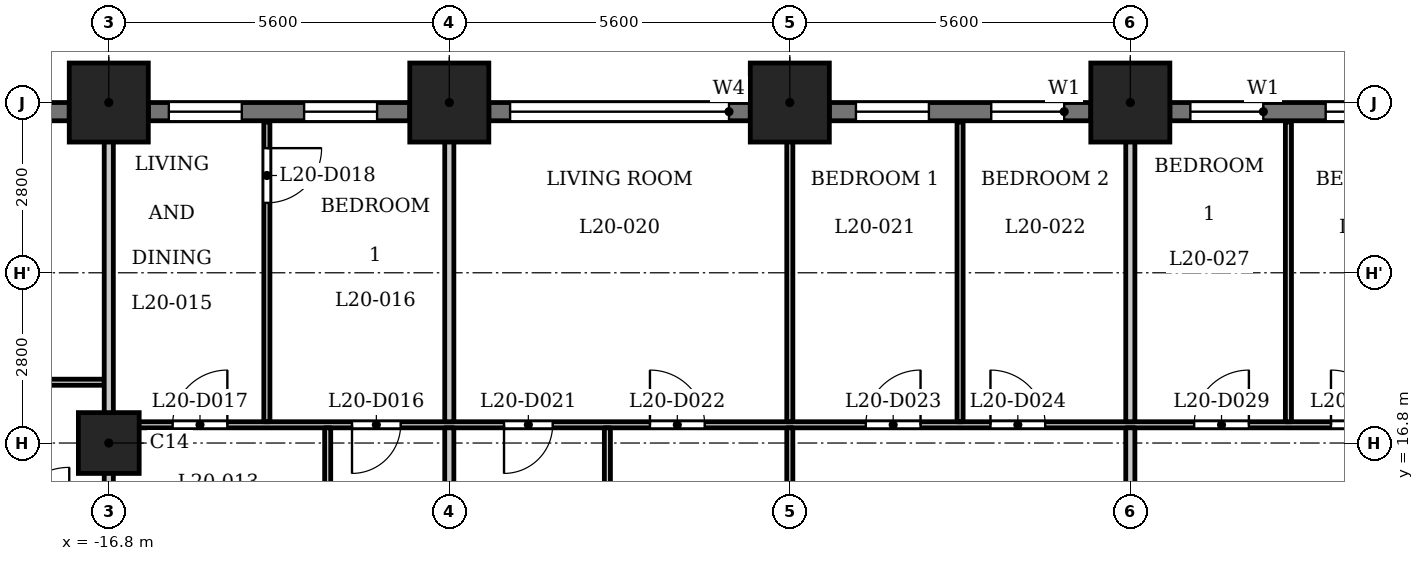
"""IFC4 building model, lengths in metres.
Left out: names, types, materials, properties, quantities, classifications, styles, units other than length and angle.
Written with IfcOpenShell. Run it as: python <this file> out.ifc"""

import sys

from ifc_helpers import new_model, si_unit, direction, frame, frame_2d, origin, origin_2d, place, context, subcontext, project, spatial, rectangle, extrude, element, fill, save


model = new_model("IFC4")
c1 = context("Model", 3, precision=1e-05, world=origin(), true_north=direction((0.0, 1.0)))
c2 = subcontext(c1, "Body", "Model", "MODEL_VIEW")
j1 = project(units=[si_unit("LENGTHUNIT", "METRE"), si_unit("PLANEANGLEUNIT", "RADIAN")], contexts=[c1])
p1 = place(None, origin())
s1 = spatial("IfcSite", under=j1, at=p1, CompositionType="ELEMENT")
p2 = place(p1, origin())
s2 = spatial("IfcBuilding", under=s1, at=p2, CompositionType="ELEMENT")
p3 = place(p2, frame((0.0, 0.0, 83.3)))
s3 = spatial("IfcBuildingStorey", under=s2, at=p3, CompositionType="ELEMENT", Elevation=83.3)
for number, where, z_axis, x_axis in (
    (1, (0.0, 22.4, 0.0), (0.0, 0.0, 1.0), (1.0, 0.0, 0.0)),
    (2, (-5.6, 22.4, 0.0), (0.0, 0.0, 1.0), (1.0, 0.0, 0.0)),
    (3, (-11.2, 22.4, 0.0), (0.0, 0.0, 1.0), (1.0, 0.0, 0.0)),
    (4, (-16.8, 22.4, 0.0), (0.0, 0.0, 1.0), (1.0, 0.0, 0.0)),
):
    element("IfcColumn", number, at=place(p3, frame(where, z_axis=z_axis, x_axis=x_axis)), inside=s3, PredefinedType="COLUMN", context=c2, shape_type="SweptSolid", body=[
        extrude(rectangle(XDim=1.3, YDim=1.3, at=origin_2d()), origin(), (0.0, 0.0, 1.0), 3.5),
    ])
p4 = place(p3, frame((-16.8, 16.8, 0.0), z_axis=(0.0, 0.0, 1.0), x_axis=(1.0, 0.0, 0.0)))
e5 = element("IfcColumn", 5, at=p4, inside=s3, PredefinedType="COLUMN", context=c2, shape_type="SweptSolid", body=[
    extrude(rectangle(XDim=1.0, YDim=1.0, at=origin_2d()), origin(), (0.0, 0.0, 1.0), 3.5),
])
p5 = place(p3, frame((4.95, 22.25, 0.0), z_axis=(0.0, 0.0, 1.0), x_axis=(-1.0, 0.0, 0.0)))
e6 = element("IfcWall", 6, at=p5, inside=s3, PredefinedType="SOLIDWALL", context=c2, shape_type="SweptSolid", body=[
    extrude(rectangle(XDim=4.3, YDim=0.3, at=frame_2d((2.15, 0.0))), origin(), (0.0, 0.0, 1.0), 2.4),
])
p6 = place(p5, frame((0.538, 0.0, 0.6)))
e7 = element("IfcOpeningElement", 7, at=p6, cuts=e6, PredefinedType="OPENING", context=c2, shape_type="SweptSolid", body=[
    extrude(rectangle(XDim=1.2, YDim=1.55, at=frame_2d((0.6, 0.775))), frame((0.0, 0.16, 0.0), z_axis=(0.0, -1.0, 0.0), x_axis=(1.0, 0.0, 0.0)), (0.0, 0.0, 1.0), 0.32),
])
p7 = place(p5, frame((2.762, 0.0, 0.6)))
e8 = element("IfcOpeningElement", 8, at=p7, cuts=e6, PredefinedType="OPENING", context=c2, shape_type="SweptSolid", body=[
    extrude(rectangle(XDim=1.2, YDim=1.55, at=frame_2d((0.6, 0.775))), frame((0.0, 0.16, 0.0), z_axis=(0.0, -1.0, 0.0), x_axis=(1.0, 0.0, 0.0)), (0.0, 0.0, 1.0), 0.32),
])
p8 = place(p3, frame((-0.65, 22.25, 0.0), z_axis=(0.0, 0.0, 1.0), x_axis=(-1.0, 0.0, 0.0)))
e9 = element("IfcWall", 9, at=p8, inside=s3, PredefinedType="SOLIDWALL", context=c2, shape_type="SweptSolid", body=[
    extrude(rectangle(XDim=4.3, YDim=0.3, at=frame_2d((2.15, 0.0))), origin(), (0.0, 0.0, 1.0), 2.4),
])
p9 = place(p8, frame((0.438, 0.0, 0.6)))
e10 = element("IfcOpeningElement", 10, at=p9, cuts=e9, PredefinedType="OPENING", context=c2, shape_type="SweptSolid", body=[
    extrude(rectangle(XDim=1.2, YDim=1.55, at=frame_2d((0.6, 0.775))), frame((0.0, 0.16, 0.0), z_axis=(0.0, -1.0, 0.0), x_axis=(1.0, 0.0, 0.0)), (0.0, 0.0, 1.0), 0.32),
])
p10 = place(p8, frame((2.663, 0.0, 0.6)))
e11 = element("IfcOpeningElement", 11, at=p10, cuts=e9, PredefinedType="OPENING", context=c2, shape_type="SweptSolid", body=[
    extrude(rectangle(XDim=1.2, YDim=1.55, at=frame_2d((0.6, 0.775))), frame((0.0, 0.16, 0.0), z_axis=(0.0, -1.0, 0.0), x_axis=(1.0, 0.0, 0.0)), (0.0, 0.0, 1.0), 0.32),
])
p11 = place(p3, frame((-6.25, 22.25, 0.0), z_axis=(0.0, 0.0, 1.0), x_axis=(-1.0, 0.0, 0.0)))
e12 = element("IfcWall", 12, at=p11, inside=s3, PredefinedType="SOLIDWALL", context=c2, shape_type="SweptSolid", body=[
    extrude(rectangle(XDim=4.3, YDim=0.3, at=frame_2d((2.15, 0.0))), origin(), (0.0, 0.0, 1.0), 2.4),
])
p12 = place(p11, frame((0.35, 0.0, 1.2)))
e13 = element("IfcOpeningElement", 13, at=p12, cuts=e12, PredefinedType="OPENING", context=c2, shape_type="SweptSolid", body=[
    extrude(rectangle(XDim=3.6, YDim=0.95, at=frame_2d((1.8, 0.475))), frame((0.0, 0.16, 0.0), z_axis=(0.0, -1.0, 0.0), x_axis=(1.0, 0.0, 0.0)), (0.0, 0.0, 1.0), 0.32),
])
p13 = place(p3, frame((-11.85, 22.25, 0.0), z_axis=(0.0, 0.0, 1.0), x_axis=(-1.0, 0.0, 0.0)))
e14 = element("IfcWall", 14, at=p13, inside=s3, PredefinedType="SOLIDWALL", context=c2, shape_type="SweptSolid", body=[
    extrude(rectangle(XDim=4.3, YDim=0.3, at=frame_2d((2.15, 0.0))), origin(), (0.0, 0.0, 1.0), 2.4),
])
p14 = place(p13, frame((0.538, 0.0, 0.6)))
e15 = element("IfcOpeningElement", 15, at=p14, cuts=e14, PredefinedType="OPENING", context=c2, shape_type="SweptSolid", body=[
    extrude(rectangle(XDim=1.2, YDim=1.55, at=frame_2d((0.6, 0.775))), frame((0.0, 0.16, 0.0), z_axis=(0.0, -1.0, 0.0), x_axis=(1.0, 0.0, 0.0)), (0.0, 0.0, 1.0), 0.32),
])
p15 = place(p13, frame((2.762, 0.0, 0.6)))
e16 = element("IfcOpeningElement", 16, at=p15, cuts=e14, PredefinedType="OPENING", context=c2, shape_type="SweptSolid", body=[
    extrude(rectangle(XDim=1.2, YDim=1.55, at=frame_2d((0.6, 0.775))), frame((0.0, 0.16, 0.0), z_axis=(0.0, -1.0, 0.0), x_axis=(1.0, 0.0, 0.0)), (0.0, 0.0, 1.0), 0.32),
])
p16 = place(p3, frame((-17.45, 22.25, 0.0), z_axis=(0.0, 0.0, 1.0), x_axis=(-1.0, 0.0, 0.0)))
e17 = element("IfcWall", 17, at=p16, inside=s3, PredefinedType="SOLIDWALL", context=c2, shape_type="SweptSolid", body=[
    extrude(rectangle(XDim=2.55, YDim=0.3, at=frame_2d((1.275, 0.0))), origin(), (0.0, 0.0, 1.0), 2.4),
])
p17 = place(p16, frame((0.675, 0.0, 0.6)))
e18 = element("IfcOpeningElement", 18, at=p17, cuts=e17, PredefinedType="OPENING", context=c2, shape_type="SweptSolid", body=[
    extrude(rectangle(XDim=1.2, YDim=1.55, at=frame_2d((0.6, 0.775))), frame((0.0, 0.16, 0.0), z_axis=(0.0, -1.0, 0.0), x_axis=(1.0, 0.0, 0.0)), (0.0, 0.0, 1.0), 0.32),
])
p18 = place(p3, frame((-16.725, 17.1, 0.0), z_axis=(0.0, 0.0, 1.0), x_axis=(1.0, 0.0, 0.0)))
e19 = element("IfcWall", 19, at=p18, inside=s3, PredefinedType="PARTITIONING", context=c2, shape_type="SweptSolid", body=[
    extrude(rectangle(XDim=33.45, YDim=0.1, at=frame_2d((16.725, 0.0))), origin(), (0.0, 0.0, 1.0), 3.2),
])
p19 = place(p18, frame((3.925, 0.0, 0.0)))
e20 = element("IfcOpeningElement", 20, at=p19, cuts=e19, PredefinedType="OPENING", context=c2, shape_type="SweptSolid", body=[
    extrude(rectangle(XDim=0.8, YDim=2.1, at=frame_2d((0.4, 1.05))), frame((0.0, 0.06, 0.0), z_axis=(0.0, -1.0, 0.0), x_axis=(1.0, 0.0, 0.0)), (0.0, 0.0, 1.0), 0.12),
])
p20 = place(p18, frame((0.975, 0.0, 0.0)))
e21 = element("IfcOpeningElement", 21, at=p20, cuts=e19, PredefinedType="OPENING", context=c2, shape_type="SweptSolid", body=[
    extrude(rectangle(XDim=0.9, YDim=2.1, at=frame_2d((0.45, 1.05))), frame((0.0, 0.06, 0.0), z_axis=(0.0, -1.0, 0.0), x_axis=(1.0, 0.0, 0.0)), (0.0, 0.0, 1.0), 0.12),
])
p21 = place(p18, frame((6.425, 0.0, 0.0)))
e22 = element("IfcOpeningElement", 22, at=p21, cuts=e19, PredefinedType="OPENING", context=c2, shape_type="SweptSolid", body=[
    extrude(rectangle(XDim=0.8, YDim=2.1, at=frame_2d((0.4, 1.05))), frame((0.0, 0.06, 0.0), z_axis=(0.0, -1.0, 0.0), x_axis=(1.0, 0.0, 0.0)), (0.0, 0.0, 1.0), 0.12),
])
p22 = place(p18, frame((8.825, 0.0, 0.0)))
e23 = element("IfcOpeningElement", 23, at=p22, cuts=e19, PredefinedType="OPENING", context=c2, shape_type="SweptSolid", body=[
    extrude(rectangle(XDim=0.9, YDim=2.1, at=frame_2d((0.45, 1.05))), frame((0.0, 0.06, 0.0), z_axis=(0.0, -1.0, 0.0), x_axis=(1.0, 0.0, 0.0)), (0.0, 0.0, 1.0), 0.12),
])
p23 = place(p18, frame((12.375, 0.0, 0.0)))
e24 = element("IfcOpeningElement", 24, at=p23, cuts=e19, PredefinedType="OPENING", context=c2, shape_type="SweptSolid", body=[
    extrude(rectangle(XDim=0.9, YDim=2.1, at=frame_2d((0.45, 1.05))), frame((0.0, 0.06, 0.0), z_axis=(0.0, -1.0, 0.0), x_axis=(1.0, 0.0, 0.0)), (0.0, 0.0, 1.0), 0.12),
])
p24 = place(p18, frame((14.425, 0.0, 0.0)))
e25 = element("IfcOpeningElement", 25, at=p24, cuts=e19, PredefinedType="OPENING", context=c2, shape_type="SweptSolid", body=[
    extrude(rectangle(XDim=0.9, YDim=2.1, at=frame_2d((0.45, 1.05))), frame((0.0, 0.06, 0.0), z_axis=(0.0, -1.0, 0.0), x_axis=(1.0, 0.0, 0.0)), (0.0, 0.0, 1.0), 0.12),
])
p25 = place(p18, frame((26.225, 0.0, 0.0)))
e26 = element("IfcOpeningElement", 26, at=p25, cuts=e19, PredefinedType="OPENING", context=c2, shape_type="SweptSolid", body=[
    extrude(rectangle(XDim=0.8, YDim=2.1, at=frame_2d((0.4, 1.05))), frame((0.0, 0.06, 0.0), z_axis=(0.0, -1.0, 0.0), x_axis=(1.0, 0.0, 0.0)), (0.0, 0.0, 1.0), 0.12),
])
p26 = place(p18, frame((23.025, 0.0, 0.0)))
e27 = element("IfcOpeningElement", 27, at=p26, cuts=e19, PredefinedType="OPENING", context=c2, shape_type="SweptSolid", body=[
    extrude(rectangle(XDim=0.9, YDim=2.1, at=frame_2d((0.45, 1.05))), frame((0.0, 0.06, 0.0), z_axis=(0.0, -1.0, 0.0), x_axis=(1.0, 0.0, 0.0)), (0.0, 0.0, 1.0), 0.12),
])
p27 = place(p18, frame((17.775, 0.0, 0.0)))
e28 = element("IfcOpeningElement", 28, at=p27, cuts=e19, PredefinedType="OPENING", context=c2, shape_type="SweptSolid", body=[
    extrude(rectangle(XDim=0.9, YDim=2.1, at=frame_2d((0.45, 1.05))), frame((0.0, 0.06, 0.0), z_axis=(0.0, -1.0, 0.0), x_axis=(1.0, 0.0, 0.0)), (0.0, 0.0, 1.0), 0.12),
])
p28 = place(p18, frame((20.025, 0.0, 0.0)))
e29 = element("IfcOpeningElement", 29, at=p28, cuts=e19, PredefinedType="OPENING", context=c2, shape_type="SweptSolid", body=[
    extrude(rectangle(XDim=0.9, YDim=2.1, at=frame_2d((0.45, 1.05))), frame((0.0, 0.06, 0.0), z_axis=(0.0, -1.0, 0.0), x_axis=(1.0, 0.0, 0.0)), (0.0, 0.0, 1.0), 0.12),
])
p29 = place(p18, frame((28.825, 0.0, 0.0)))
e30 = element("IfcOpeningElement", 30, at=p29, cuts=e19, PredefinedType="OPENING", context=c2, shape_type="SweptSolid", body=[
    extrude(rectangle(XDim=0.8, YDim=2.1, at=frame_2d((0.4, 1.05))), frame((0.0, 0.06, 0.0), z_axis=(0.0, -1.0, 0.0), x_axis=(1.0, 0.0, 0.0)), (0.0, 0.0, 1.0), 0.12),
])
p30 = place(p18, frame((31.975, 0.0, 0.0)))
e31 = element("IfcOpeningElement", 31, at=p30, cuts=e19, PredefinedType="OPENING", context=c2, shape_type="SweptSolid", body=[
    extrude(rectangle(XDim=0.9, YDim=2.1, at=frame_2d((0.45, 1.05))), frame((0.0, 0.06, 0.0), z_axis=(0.0, -1.0, 0.0), x_axis=(1.0, 0.0, 0.0)), (0.0, 0.0, 1.0), 0.12),
])
p31 = place(p3, frame((-26.554, 17.8, 0.0), z_axis=(0.0, 0.0, 1.0), x_axis=(1.0, 0.0, 0.0)))
e32 = element("IfcWall", 32, at=p31, inside=s3, PredefinedType="PARTITIONING", context=c2, shape_type="SweptSolid", body=[
    extrude(rectangle(XDim=9.679, YDim=0.1, at=frame_2d((4.84, 0.0))), origin(), (0.0, 0.0, 1.0), 3.2),
])
p32 = place(p31, frame((2.786, 0.0, 0.0)))
e33 = element("IfcOpeningElement", 33, at=p32, cuts=e32, PredefinedType="OPENING", context=c2, shape_type="SweptSolid", body=[
    extrude(rectangle(XDim=0.8, YDim=2.1, at=frame_2d((0.4, 1.05))), frame((0.0, 0.06, 0.0), z_axis=(0.0, -1.0, 0.0), x_axis=(1.0, 0.0, 0.0)), (0.0, 0.0, 1.0), 0.12),
])
p33 = place(p31, frame((7.204, 0.0, 0.0)))
e34 = element("IfcOpeningElement", 34, at=p33, cuts=e32, PredefinedType="OPENING", context=c2, shape_type="SweptSolid", body=[
    extrude(rectangle(XDim=0.9, YDim=2.1, at=frame_2d((0.45, 1.05))), frame((0.0, 0.06, 0.0), z_axis=(0.0, -1.0, 0.0), x_axis=(1.0, 0.0, 0.0)), (0.0, 0.0, 1.0), 0.12),
])
p34 = place(p3, frame((-16.8, 15.475, 0.0), z_axis=(0.0, 0.0, 1.0), x_axis=(0.0, 1.0, 0.0)))
e35 = element("IfcWall", 35, at=p34, inside=s3, PredefinedType="PARTITIONING", context=c2, shape_type="SweptSolid", body=[
    extrude(rectangle(XDim=7.555, YDim=0.15, at=frame_2d((3.777, 0.0))), origin(), (0.0, 0.0, 1.0), 3.2),
])
p35 = place(p3, frame((-14.2, 17.15, 0.0), z_axis=(0.0, 0.0, 1.0), x_axis=(0.0, 1.0, 0.0)))
e36 = element("IfcWall", 36, at=p35, inside=s3, PredefinedType="PARTITIONING", context=c2, shape_type="SweptSolid", body=[
    extrude(rectangle(XDim=4.93, YDim=0.1, at=frame_2d((2.465, 0.0))), origin(), (0.0, 0.0, 1.0), 3.2),
])
p36 = place(p35, frame((3.6, 0.0, 0.0)))
e37 = element("IfcOpeningElement", 37, at=p36, cuts=e36, PredefinedType="OPENING", context=c2, shape_type="SweptSolid", body=[
    extrude(rectangle(XDim=0.9, YDim=2.1, at=frame_2d((0.45, 1.05))), frame((0.0, 0.06, 0.0), z_axis=(0.0, -1.0, 0.0), x_axis=(1.0, 0.0, 0.0)), (0.0, 0.0, 1.0), 0.12),
])
p37 = place(p3, frame((-13.2, 13.275, 0.0), z_axis=(0.0, 0.0, 1.0), x_axis=(0.0, 1.0, 0.0)))
e38 = element("IfcWall", 38, at=p37, inside=s3, PredefinedType="PARTITIONING", context=c2, shape_type="SweptSolid", body=[
    extrude(rectangle(XDim=3.775, YDim=0.1, at=frame_2d((1.888, 0.0))), origin(), (0.0, 0.0, 1.0), 3.2),
])
p38 = place(p3, frame((-11.2, 13.275, 0.0), z_axis=(0.0, 0.0, 1.0), x_axis=(0.0, 1.0, 0.0)))
e39 = element("IfcWall", 39, at=p38, inside=s3, PredefinedType="PARTITIONING", context=c2, shape_type="SweptSolid", body=[
    extrude(rectangle(XDim=3.775, YDim=0.15, at=frame_2d((1.888, 0.0))), origin(), (0.0, 0.0, 1.0), 3.2),
])
p39 = place(p3, frame((-11.2, 17.15, 0.0), z_axis=(0.0, 0.0, 1.0), x_axis=(0.0, 1.0, 0.0)))
e40 = element("IfcWall", 40, at=p39, inside=s3, PredefinedType="PARTITIONING", context=c2, shape_type="SweptSolid", body=[
    extrude(rectangle(XDim=5.88, YDim=0.15, at=frame_2d((2.94, 0.0))), origin(), (0.0, 0.0, 1.0), 3.2),
])
p40 = place(p3, frame((-8.6, 13.275, 0.0), z_axis=(0.0, 0.0, 1.0), x_axis=(0.0, 1.0, 0.0)))
e41 = element("IfcWall", 41, at=p40, inside=s3, PredefinedType="PARTITIONING", context=c2, shape_type="SweptSolid", body=[
    extrude(rectangle(XDim=3.775, YDim=0.1, at=frame_2d((1.888, 0.0))), origin(), (0.0, 0.0, 1.0), 3.2),
])
p41 = place(p3, frame((-5.6, 13.275, 0.0), z_axis=(0.0, 0.0, 1.0), x_axis=(0.0, 1.0, 0.0)))
e42 = element("IfcWall", 42, at=p41, inside=s3, PredefinedType="PARTITIONING", context=c2, shape_type="SweptSolid", body=[
    extrude(rectangle(XDim=3.775, YDim=0.1, at=frame_2d((1.888, 0.0))), origin(), (0.0, 0.0, 1.0), 3.2),
])
p42 = place(p41, frame((0.525, 0.0, 0.0)))
e43 = element("IfcOpeningElement", 43, at=p42, cuts=e42, PredefinedType="OPENING", context=c2, shape_type="SweptSolid", body=[
    extrude(rectangle(XDim=0.9, YDim=2.1, at=frame_2d((0.45, 1.05))), frame((0.0, 0.06, 0.0), z_axis=(0.0, -1.0, 0.0), x_axis=(1.0, 0.0, 0.0)), (0.0, 0.0, 1.0), 0.12),
])
p43 = place(p3, frame((-5.6, 17.15, 0.0), z_axis=(0.0, 0.0, 1.0), x_axis=(0.0, 1.0, 0.0)))
e44 = element("IfcWall", 44, at=p43, inside=s3, PredefinedType="PARTITIONING", context=c2, shape_type="SweptSolid", body=[
    extrude(rectangle(XDim=5.88, YDim=0.1, at=frame_2d((2.94, 0.0))), origin(), (0.0, 0.0, 1.0), 3.2),
])
p44 = place(p3, frame((-2.8, 17.15, 0.0), z_axis=(0.0, 0.0, 1.0), x_axis=(0.0, 1.0, 0.0)))
e45 = element("IfcWall", 45, at=p44, inside=s3, PredefinedType="PARTITIONING", context=c2, shape_type="SweptSolid", body=[
    extrude(rectangle(XDim=4.93, YDim=0.1, at=frame_2d((2.465, 0.0))), origin(), (0.0, 0.0, 1.0), 3.2),
])
p45 = place(p3, frame((0.0, 13.275, 0.0), z_axis=(0.0, 0.0, 1.0), x_axis=(0.0, 1.0, 0.0)))
e46 = element("IfcWall", 46, at=p45, inside=s3, PredefinedType="PARTITIONING", context=c2, shape_type="SweptSolid", body=[
    extrude(rectangle(XDim=3.775, YDim=0.15, at=frame_2d((1.888, 0.0))), origin(), (0.0, 0.0, 1.0), 3.2),
])
p46 = place(p3, frame((0.0, 17.15, 0.0), z_axis=(0.0, 0.0, 1.0), x_axis=(0.0, 1.0, 0.0)))
e47 = element("IfcWall", 47, at=p46, inside=s3, PredefinedType="PARTITIONING", context=c2, shape_type="SweptSolid", body=[
    extrude(rectangle(XDim=5.88, YDim=0.15, at=frame_2d((2.94, 0.0))), origin(), (0.0, 0.0, 1.0), 3.2),
])
p47 = place(p3, frame((2.6, 17.15, 0.0), z_axis=(0.0, 0.0, 1.0), x_axis=(0.0, 1.0, 0.0)))
e48 = element("IfcWall", 48, at=p47, inside=s3, PredefinedType="PARTITIONING", context=c2, shape_type="SweptSolid", body=[
    extrude(rectangle(XDim=4.93, YDim=0.1, at=frame_2d((2.465, 0.0))), origin(), (0.0, 0.0, 1.0), 3.2),
])
p48 = place(p19, origin())
e49 = element("IfcDoor", 49, at=p48, inside=s3, OperationType="SINGLE_SWING_LEFT", PredefinedType="DOOR", context=c2, shape_type="SweptSolid", body=[
    extrude(rectangle(XDim=0.8, YDim=2.1, at=frame_2d((0.4, 1.05))), frame((0.0, 0.025, 0.0), z_axis=(0.0, -1.0, 0.0), x_axis=(1.0, 0.0, 0.0)), (0.0, 0.0, 1.0), 0.05),
])
fill(e20, e49)
p49 = place(p20, origin())
e50 = element("IfcDoor", 50, at=p49, inside=s3, OperationType="SINGLE_SWING_LEFT", PredefinedType="DOOR", context=c2, shape_type="SweptSolid", body=[
    extrude(rectangle(XDim=0.9, YDim=2.1, at=frame_2d((0.45, 1.05))), frame((0.0, 0.025, 0.0), z_axis=(0.0, -1.0, 0.0), x_axis=(1.0, 0.0, 0.0)), (0.0, 0.0, 1.0), 0.05),
])
fill(e21, e50)
p50 = place(p36, origin())
e51 = element("IfcDoor", 51, at=p50, inside=s3, OperationType="SINGLE_SWING_RIGHT", PredefinedType="DOOR", context=c2, shape_type="SweptSolid", body=[
    extrude(rectangle(XDim=0.9, YDim=2.1, at=frame_2d((0.45, 1.05))), frame((0.0, 0.025, 0.0), z_axis=(0.0, -1.0, 0.0), x_axis=(1.0, 0.0, 0.0)), (0.0, 0.0, 1.0), 0.05),
])
fill(e37, e51)
p51 = place(p21, origin())
e52 = element("IfcDoor", 52, at=p51, inside=s3, OperationType="SINGLE_SWING_LEFT", PredefinedType="DOOR", context=c2, shape_type="SweptSolid", body=[
    extrude(rectangle(XDim=0.8, YDim=2.1, at=frame_2d((0.4, 1.05))), frame((0.0, 0.025, 0.0), z_axis=(0.0, -1.0, 0.0), x_axis=(1.0, 0.0, 0.0)), (0.0, 0.0, 1.0), 0.05),
])
fill(e22, e52)
p52 = place(p22, origin())
e53 = element("IfcDoor", 53, at=p52, inside=s3, OperationType="SINGLE_SWING_RIGHT", PredefinedType="DOOR", context=c2, shape_type="SweptSolid", body=[
    extrude(rectangle(XDim=0.9, YDim=2.1, at=frame_2d((0.45, 1.05))), frame((0.0, 0.025, 0.0), z_axis=(0.0, -1.0, 0.0), x_axis=(1.0, 0.0, 0.0)), (0.0, 0.0, 1.0), 0.05),
])
fill(e23, e53)
p53 = place(p23, origin())
e54 = element("IfcDoor", 54, at=p53, inside=s3, OperationType="SINGLE_SWING_LEFT", PredefinedType="DOOR", context=c2, shape_type="SweptSolid", body=[
    extrude(rectangle(XDim=0.9, YDim=2.1, at=frame_2d((0.45, 1.05))), frame((0.0, 0.025, 0.0), z_axis=(0.0, -1.0, 0.0), x_axis=(1.0, 0.0, 0.0)), (0.0, 0.0, 1.0), 0.05),
])
fill(e24, e54)
p54 = place(p24, origin())
e55 = element("IfcDoor", 55, at=p54, inside=s3, OperationType="SINGLE_SWING_RIGHT", PredefinedType="DOOR", context=c2, shape_type="SweptSolid", body=[
    extrude(rectangle(XDim=0.9, YDim=2.1, at=frame_2d((0.45, 1.05))), frame((0.0, 0.025, 0.0), z_axis=(0.0, -1.0, 0.0), x_axis=(1.0, 0.0, 0.0)), (0.0, 0.0, 1.0), 0.05),
])
fill(e25, e55)
p55 = place(p27, origin())
e56 = element("IfcDoor", 56, at=p55, inside=s3, OperationType="SINGLE_SWING_LEFT", PredefinedType="DOOR", context=c2, shape_type="SweptSolid", body=[
    extrude(rectangle(XDim=0.9, YDim=2.1, at=frame_2d((0.45, 1.05))), frame((0.0, 0.025, 0.0), z_axis=(0.0, -1.0, 0.0), x_axis=(1.0, 0.0, 0.0)), (0.0, 0.0, 1.0), 0.05),
])
fill(e28, e56)
p56 = place(p28, origin())
e57 = element("IfcDoor", 57, at=p56, inside=s3, OperationType="SINGLE_SWING_RIGHT", PredefinedType="DOOR", context=c2, shape_type="SweptSolid", body=[
    extrude(rectangle(XDim=0.9, YDim=2.1, at=frame_2d((0.45, 1.05))), frame((0.0, 0.025, 0.0), z_axis=(0.0, -1.0, 0.0), x_axis=(1.0, 0.0, 0.0)), (0.0, 0.0, 1.0), 0.05),
])
fill(e29, e57)
p57 = place(p6, origin())
e58 = element("IfcWindow", 58, at=p57, inside=s3, PartitioningType="SINGLE_PANEL", PredefinedType="WINDOW", context=c2, shape_type="SweptSolid", body=[
    extrude(rectangle(XDim=1.2, YDim=1.55, at=frame_2d((0.6, 0.775))), frame((0.0, 0.03, 0.0), z_axis=(0.0, -1.0, 0.0), x_axis=(1.0, 0.0, 0.0)), (0.0, 0.0, 1.0), 0.06),
])
fill(e7, e58)
p58 = place(p7, origin())
e59 = element("IfcWindow", 59, at=p58, inside=s3, PartitioningType="SINGLE_PANEL", PredefinedType="WINDOW", context=c2, shape_type="SweptSolid", body=[
    extrude(rectangle(XDim=1.2, YDim=1.55, at=frame_2d((0.6, 0.775))), frame((0.0, 0.03, 0.0), z_axis=(0.0, -1.0, 0.0), x_axis=(1.0, 0.0, 0.0)), (0.0, 0.0, 1.0), 0.06),
])
fill(e8, e59)
p59 = place(p9, origin())
e60 = element("IfcWindow", 60, at=p59, inside=s3, PartitioningType="SINGLE_PANEL", PredefinedType="WINDOW", context=c2, shape_type="SweptSolid", body=[
    extrude(rectangle(XDim=1.2, YDim=1.55, at=frame_2d((0.6, 0.775))), frame((0.0, 0.03, 0.0), z_axis=(0.0, -1.0, 0.0), x_axis=(1.0, 0.0, 0.0)), (0.0, 0.0, 1.0), 0.06),
])
fill(e10, e60)
p60 = place(p10, origin())
e61 = element("IfcWindow", 61, at=p60, inside=s3, PartitioningType="SINGLE_PANEL", PredefinedType="WINDOW", context=c2, shape_type="SweptSolid", body=[
    extrude(rectangle(XDim=1.2, YDim=1.55, at=frame_2d((0.6, 0.775))), frame((0.0, 0.03, 0.0), z_axis=(0.0, -1.0, 0.0), x_axis=(1.0, 0.0, 0.0)), (0.0, 0.0, 1.0), 0.06),
])
fill(e11, e61)
p61 = place(p12, origin())
e62 = element("IfcWindow", 62, at=p61, inside=s3, PartitioningType="SINGLE_PANEL", PredefinedType="WINDOW", context=c2, shape_type="SweptSolid", body=[
    extrude(rectangle(XDim=3.6, YDim=0.95, at=frame_2d((1.8, 0.475))), frame((0.0, 0.03, 0.0), z_axis=(0.0, -1.0, 0.0), x_axis=(1.0, 0.0, 0.0)), (0.0, 0.0, 1.0), 0.06),
])
fill(e13, e62)
p62 = place(p14, origin())
e63 = element("IfcWindow", 63, at=p62, inside=s3, PartitioningType="SINGLE_PANEL", PredefinedType="WINDOW", context=c2, shape_type="SweptSolid", body=[
    extrude(rectangle(XDim=1.2, YDim=1.55, at=frame_2d((0.6, 0.775))), frame((0.0, 0.03, 0.0), z_axis=(0.0, -1.0, 0.0), x_axis=(1.0, 0.0, 0.0)), (0.0, 0.0, 1.0), 0.06),
])
fill(e15, e63)
p63 = place(p15, origin())
e64 = element("IfcWindow", 64, at=p63, inside=s3, PartitioningType="SINGLE_PANEL", PredefinedType="WINDOW", context=c2, shape_type="SweptSolid", body=[
    extrude(rectangle(XDim=1.2, YDim=1.55, at=frame_2d((0.6, 0.775))), frame((0.0, 0.03, 0.0), z_axis=(0.0, -1.0, 0.0), x_axis=(1.0, 0.0, 0.0)), (0.0, 0.0, 1.0), 0.06),
])
fill(e16, e64)
save(model, sys.argv[1])
